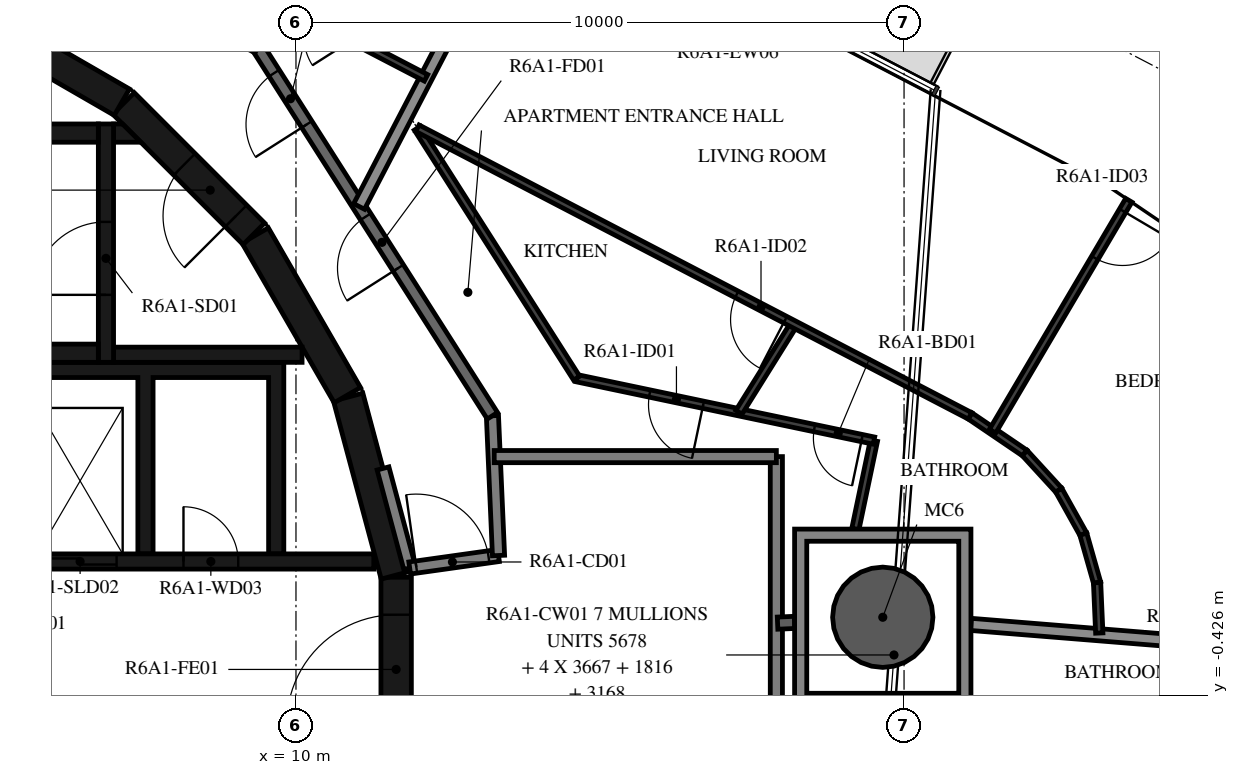
"""IFC4 building model, lengths in metres.
Left out: names, types, materials, properties, quantities, classifications, styles, units other than length and angle.
Written with IfcOpenShell. Run it as: python <this file> out.ifc"""

import sys

from ifc_helpers import new_model, si_unit, direction, frame, frame_2d, origin, origin_2d, place, context, subcontext, project, spatial, polyline, rectangle, hollow_circle, outline, extrude, element, fill, save


model = new_model("IFC4")
c1 = context("Model", 3, precision=1e-05, world=origin(), true_north=direction((0.0, 1.0)))
c2 = subcontext(c1, "Body", "Model", "MODEL_VIEW")
j1 = project(units=[si_unit("LENGTHUNIT", "METRE"), si_unit("PLANEANGLEUNIT", "RADIAN")], contexts=[c1])
p1 = place(None, origin())
s1 = spatial("IfcSite", under=j1, at=p1, CompositionType="ELEMENT")
p2 = place(p1, origin())
s2 = spatial("IfcBuilding", under=s1, at=p2, CompositionType="ELEMENT")
p3 = place(p2, frame((0.0, 0.0, 230.2)))
s3 = spatial("IfcBuildingStorey", under=s2, at=p3, CompositionType="ELEMENT", Elevation=230.2)
p4 = place(p3, frame((19.65, 0.858, -0.38), z_axis=(0.0, 0.0, 1.0), x_axis=(1.0, 0.0, 0.0)))
e1 = element("IfcColumn", 1, at=p4, inside=s3, PredefinedType="COLUMN", context=c2, shape_type="SweptSolid", body=[
    extrude(hollow_circle(Radius=0.825, WallThickness=0.04, at=origin_2d()), origin(), (0.0, 0.0, 1.0), 3.5),
])
p5 = place(p3, frame((11.647, -1.516, 0.0), z_axis=(0.0, 0.0, 1.0), x_axis=(0.0, 1.0, 0.0)))
e2 = element("IfcWall", 2, at=p5, inside=s3, PredefinedType="SHEAR", context=c2, shape_type="SweptSolid", body=[
    extrude(rectangle(XDim=3.033, YDim=0.5, at=frame_2d((1.516, 0.0))), origin(), (0.0, 0.0, 1.0), 3.12),
])
p6 = place(p5, frame((0.616, 0.0, 0.0)))
e3 = element("IfcOpeningElement", 3, at=p6, cuts=e2, PredefinedType="OPENING", context=c2, shape_type="SweptSolid", body=[
    extrude(rectangle(XDim=1.8, YDim=2.1, at=frame_2d((0.9, 1.05))), frame((0.0, 0.26, 0.0), z_axis=(0.0, -1.0, 0.0), x_axis=(1.0, 0.0, 0.0)), (0.0, 0.0, 1.0), 0.52),
])
for number, where, z_axis, x_axis in (
    (4, (11.643, 1.55, 0.0), (0.0, 0.0, 1.0), (-0.259, 0.966, 0.0)),
    (5, (10.845, 4.51, 0.0), (0.0, 0.0, 1.0), (-0.5, 0.866, 0.0)),
):
    element("IfcWall", number, at=place(p3, frame(where, z_axis=z_axis, x_axis=x_axis)), inside=s3, PredefinedType="SHEAR", context=c2, shape_type="SweptSolid", body=[
        extrude(rectangle(XDim=3.033, YDim=0.5, at=frame_2d((1.516, 0.0))), origin(), (0.0, 0.0, 1.0), 3.12),
    ])
p7 = place(p3, frame((9.308, 7.164, 0.0), z_axis=(0.0, 0.0, 1.0), x_axis=(-0.707106781187, 0.707106781187, 0.0)))
e6 = element("IfcWall", 6, at=p7, inside=s3, PredefinedType="SHEAR", context=c2, shape_type="SweptSolid", body=[
    extrude(rectangle(XDim=3.032, YDim=0.5, at=frame_2d((1.516, 0.0))), origin(), (0.0, 0.0, 1.0), 3.12),
])
p8 = place(p7, frame((0.416, 0.0, 0.0)))
e7 = element("IfcOpeningElement", 7, at=p8, cuts=e6, PredefinedType="OPENING", context=c2, shape_type="SweptSolid", body=[
    extrude(rectangle(XDim=1.2, YDim=2.1, at=frame_2d((0.6, 1.05))), frame((0.0, 0.26, 0.0), z_axis=(0.0, -1.0, 0.0), x_axis=(1.0, 0.0, 0.0)), (0.0, 0.0, 1.0), 0.52),
])
p9 = place(p3, frame((7.137, 9.329, 0.0), z_axis=(0.0, 0.0, 1.0), x_axis=(-0.865975092491, 0.500087131594, 0.0)))
e8 = element("IfcWall", 8, at=p9, inside=s3, PredefinedType="SHEAR", context=c2, shape_type="SweptSolid", body=[
    extrude(rectangle(XDim=3.033, YDim=0.5, at=frame_2d((1.516, 0.0))), origin(), (0.0, 0.0, 1.0), 3.12),
])
for number, where, z_axis, x_axis in (
    (9, (0.0, 5.2, 0.0), (0.0, 0.0, 1.0), (1.0, 0.0, 0.0)),
    (10, (0.0, 8.82, 0.0), (0.0, 0.0, 1.0), (1.0, 0.0, 0.0)),
):
    element("IfcWall", number, at=place(p3, frame(where, z_axis=z_axis, x_axis=x_axis)), inside=s3, PredefinedType="SHEAR", context=c2, shape_type="SweptSolid", body=[
        extrude(rectangle(XDim=6.75, YDim=0.3, at=frame_2d((3.375, 0.0))), origin(), (0.0, 0.0, 1.0), 3.12),
    ])
p10 = place(p3, frame((6.875, 5.05, 0.0), z_axis=(0.0, 0.0, 1.0), x_axis=(0.0, 1.0, 0.0)))
e11 = element("IfcWall", 11, at=p10, inside=s3, PredefinedType="SHEAR", context=c2, shape_type="SweptSolid", body=[
    extrude(rectangle(XDim=3.92, YDim=0.25, at=frame_2d((1.96, 0.0))), origin(), (0.0, 0.0, 1.0), 3.12),
])
p11 = place(p10, frame((1.11, 0.0, 0.0)))
e12 = element("IfcOpeningElement", 12, at=p11, cuts=e11, PredefinedType="OPENING", context=c2, shape_type="SweptSolid", body=[
    extrude(rectangle(XDim=1.2, YDim=2.1, at=frame_2d((0.6, 1.05))), frame((0.0, 0.135, 0.0), z_axis=(0.0, -1.0, 0.0), x_axis=(1.0, 0.0, 0.0)), (0.0, 0.0, 1.0), 0.27),
])
p12 = place(p3, frame((7.0, 5.175, 0.0), z_axis=(0.0, 0.0, 1.0), x_axis=(1.0, 0.0, 0.0)))
e13 = element("IfcWall", 13, at=p12, inside=s3, PredefinedType="SHEAR", context=c2, shape_type="SweptSolid", body=[
    extrude(rectangle(XDim=3.1, YDim=0.25, at=frame_2d((1.55, 0.0))), origin(), (0.0, 0.0, 1.0), 3.12),
])
p13 = place(p3, origin())
e14 = element("IfcWall", 14, at=p13, inside=s3, PredefinedType="SHEAR", context=c2, shape_type="SweptSolid", body=[
    extrude(outline(polyline([(7.448, 8.67), (7.0, 8.67), (7.0, 8.97), (7.148, 8.97), (7.448, 8.67)])), origin(), (0.0, 0.0, 1.0), 3.12),
])
p14 = place(p3, origin())
e15 = element("IfcWall", 15, at=p14, inside=s3, PredefinedType="SHEAR", context=c2, shape_type="SweptSolid", body=[
    extrude(outline(polyline([(-9.55, 4.8), (-5.5, 4.8), (-5.5, 1.9), (-5.25, 1.9), (-5.25, 4.8), (-1.2, 4.8), (-1.2, 1.9), (-0.95, 1.9), (-0.95, 4.8), (0.95, 4.8), (0.95, 1.9), (1.2, 1.9), (1.2, 4.8), (3.1, 4.8), (3.1, 1.9), (3.35, 1.9), (3.35, 4.8), (5.25, 4.8), (5.25, 1.9), (5.5, 1.9), (5.5, 4.8), (7.4, 4.8), (7.4, 1.9), (7.65, 1.9), (7.65, 4.8), (9.55, 4.8), (9.55, 1.9), (9.8, 1.9), (9.8, 4.8), (9.8, 5.05), (-9.8, 5.05), (-9.8, 4.8), (-9.8, 1.9), (-9.55, 1.9), (-9.55, 4.8)])), origin(), (0.0, 0.0, 1.0), 3.12),
])
p15 = place(p3, frame((3.35, 1.775, 0.0), z_axis=(0.0, 0.0, 1.0), x_axis=(1.0, 0.0, 0.0)))
e16 = element("IfcWall", 16, at=p15, inside=s3, PredefinedType="SHEAR", context=c2, shape_type="SweptSolid", body=[
    extrude(rectangle(XDim=7.93, YDim=0.25, at=frame_2d((3.965, 0.0))), origin(), (0.0, 0.0, 1.0), 3.12),
])
p16 = place(p15, frame((0.35, 0.0, 0.0)))
e17 = element("IfcOpeningElement", 17, at=p16, cuts=e16, PredefinedType="OPENING", context=c2, shape_type="SweptSolid", body=[
    extrude(rectangle(XDim=1.2, YDim=2.4, at=frame_2d((0.6, 1.2))), frame((0.0, 0.135, 0.0), z_axis=(0.0, -1.0, 0.0), x_axis=(1.0, 0.0, 0.0)), (0.0, 0.0, 1.0), 0.27),
])
p17 = place(p15, frame((2.5, 0.0, 0.0)))
e18 = element("IfcOpeningElement", 18, at=p17, cuts=e16, PredefinedType="OPENING", context=c2, shape_type="SweptSolid", body=[
    extrude(rectangle(XDim=1.2, YDim=2.4, at=frame_2d((0.6, 1.2))), frame((0.0, 0.135, 0.0), z_axis=(0.0, -1.0, 0.0), x_axis=(1.0, 0.0, 0.0)), (0.0, 0.0, 1.0), 0.27),
])
p18 = place(p15, frame((4.8, 0.0, 0.0)))
e19 = element("IfcOpeningElement", 19, at=p18, cuts=e16, PredefinedType="OPENING", context=c2, shape_type="SweptSolid", body=[
    extrude(rectangle(XDim=0.9, YDim=2.1, at=frame_2d((0.45, 1.05))), frame((0.0, 0.135, 0.0), z_axis=(0.0, -1.0, 0.0), x_axis=(1.0, 0.0, 0.0)), (0.0, 0.0, 1.0), 0.27),
])
p19 = place(p3, frame((11.87, 1.668, 0.0), z_axis=(0.0, 0.0, 1.0), x_axis=(-0.258836880648, 0.965921047093, 0.0)))
e20 = element("IfcWall", 20, at=p19, inside=s3, PredefinedType="STANDARD", context=c2, shape_type="SweptSolid", body=[
    extrude(rectangle(XDim=1.695, YDim=0.2, at=frame_2d((0.848, 0.0))), origin(), (0.0, 0.0, 1.0), 3.12),
])
p20 = place(p3, frame((11.87, 1.668, 0.0), z_axis=(0.0, 0.0, 1.0), x_axis=(0.990267985606, 0.139173692496, 0.0)))
e21 = element("IfcWall", 21, at=p20, inside=s3, PredefinedType="STANDARD", context=c2, shape_type="SweptSolid", body=[
    extrude(rectangle(XDim=1.475, YDim=0.2, at=frame_2d((0.738, 0.0))), origin(), (0.0, 0.0, 1.0), 3.12),
])
p21 = place(p20, frame((0.11, 0.0, 0.0)))
e22 = element("IfcOpeningElement", 22, at=p21, cuts=e21, PredefinedType="OPENING", context=c2, shape_type="SweptSolid", body=[
    extrude(rectangle(XDim=1.2, YDim=2.1, at=frame_2d((0.6, 1.05))), frame((0.0, 0.11, 0.0), z_axis=(0.0, -1.0, 0.0), x_axis=(1.0, 0.0, 0.0)), (0.0, 0.0, 1.0), 0.22),
])
p22 = place(p3, frame((13.331, 1.874, 0.0), z_axis=(0.0, 0.0, 1.0), x_axis=(-0.043621457762, 0.999048131184, 0.0)))
e23 = element("IfcWall", 23, at=p22, inside=s3, PredefinedType="STANDARD", context=c2, shape_type="SweptSolid", body=[
    extrude(rectangle(XDim=2.3, YDim=0.2, at=frame_2d((1.15, 0.0))), origin(), (0.0, 0.0, 1.0), 3.12),
])
p23 = place(p3, frame((13.231, 4.172, 0.0), z_axis=(0.0, 0.0, 1.0), x_axis=(-0.537304397561, 0.843388394728, 0.0)))
e24 = element("IfcWall", 24, at=p23, inside=s3, PredefinedType="STANDARD", context=c2, shape_type="SweptSolid", body=[
    extrude(rectangle(XDim=7.181, YDim=0.2, at=frame_2d((3.59, 0.0))), origin(), (0.0, 0.0, 1.0), 3.12),
])
p24 = place(p23, frame((2.881, 0.0, 0.0)))
e25 = element("IfcOpeningElement", 25, at=p24, cuts=e24, PredefinedType="OPENING", context=c2, shape_type="SweptSolid", body=[
    extrude(rectangle(XDim=1.0, YDim=2.1, at=frame_2d((0.5, 1.05))), frame((0.0, 0.11, 0.0), z_axis=(0.0, -1.0, 0.0), x_axis=(1.0, 0.0, 0.0)), (0.0, 0.0, 1.0), 0.22),
])
p25 = place(p23, frame((5.681, 0.0, 0.0)))
e26 = element("IfcOpeningElement", 26, at=p25, cuts=e24, PredefinedType="OPENING", context=c2, shape_type="SweptSolid", body=[
    extrude(rectangle(XDim=1.0, YDim=2.1, at=frame_2d((0.5, 1.05))), frame((0.0, 0.11, 0.0), z_axis=(0.0, -1.0, 0.0), x_axis=(1.0, 0.0, 0.0)), (0.0, 0.0, 1.0), 0.22),
])
p26 = place(p3, frame((9.372, 10.228, 0.0), z_axis=(0.0, 0.0, 1.0), x_axis=(-0.887005184532, 0.461759464021, 0.0)))
e27 = element("IfcWall", 27, at=p26, inside=s3, PredefinedType="STANDARD", context=c2, shape_type="SweptSolid", body=[
    extrude(rectangle(XDim=7.181, YDim=0.2, at=frame_2d((3.591, 0.0))), origin(), (0.0, 0.0, 1.0), 3.12),
])
p27 = place(p3, frame((17.9, -1.772, 0.0), z_axis=(0.0, 0.0, 1.0), x_axis=(0.0, 1.0, 0.0)))
e28 = element("IfcWall", 28, at=p27, inside=s3, PredefinedType="STANDARD", context=c2, shape_type="SweptSolid", body=[
    extrude(rectangle(XDim=5.272, YDim=0.2, at=frame_2d((2.636, 0.0))), origin(), (0.0, 0.0, 1.0), 3.12),
])
p28 = place(p3, frame((17.9, 3.5, 0.0), z_axis=(0.0, 0.0, 1.0), x_axis=(-1.0, 0.0, 0.0)))
e29 = element("IfcWall", 29, at=p28, inside=s3, PredefinedType="STANDARD", context=c2, shape_type="SweptSolid", body=[
    extrude(rectangle(XDim=4.64, YDim=0.2, at=frame_2d((2.32, 0.0))), origin(), (0.0, 0.0, 1.0), 3.12),
])
p29 = place(p3, frame((13.801, 12.922, 0.0), z_axis=(0.0, 0.0, 1.0), x_axis=(-0.461726485624, -0.887022351733, 0.0)))
e30 = element("IfcWall", 30, at=p29, inside=s3, PredefinedType="STANDARD", context=c2, shape_type="SweptSolid", body=[
    extrude(rectangle(XDim=5.984, YDim=0.2, at=frame_2d((2.992, 0.0))), origin(), (0.0, 0.0, 1.0), 2.73),
])
p30 = place(p3, frame((17.92, 0.761, 0.0), z_axis=(0.0, 0.0, 1.0), x_axis=(0.999051221661, 0.04355061995, 0.0)))
e31 = element("IfcWall", 31, at=p30, inside=s3, PredefinedType="STANDARD", context=c2, shape_type="SweptSolid", body=[
    extrude(rectangle(XDim=0.28, YDim=0.2, at=frame_2d((0.14, 0.0))), origin(), (0.0, 0.0, 1.0), 3.12),
])
p31 = place(p3, frame((21.1, 0.741, 0.0), z_axis=(0.0, 0.0, 1.0), x_axis=(0.996750718609, -0.080548153006, 0.0)))
e32 = element("IfcWall", 32, at=p31, inside=s3, PredefinedType="STANDARD", context=c2, shape_type="SweptSolid", body=[
    extrude(rectangle(XDim=6.538, YDim=0.2, at=frame_2d((3.269, 0.0))), origin(), (0.0, 0.0, 1.0), 2.73),
])
p32 = place(p3, frame((19.199, 2.308, 0.0), z_axis=(0.0, 0.0, 1.0), x_axis=(0.205580140246, 0.978640284239, 0.0)))
e33 = element("IfcWall", 33, at=p32, inside=s3, PredefinedType="PARTITIONING", context=c2, shape_type="SweptSolid", body=[
    extrude(rectangle(XDim=1.487, YDim=0.12, at=frame_2d((0.743, 0.0))), origin(), (0.0, 0.0, 1.0), 3.12),
])
p33 = place(p3, frame((19.505, 3.763, 0.0), z_axis=(0.0, 0.0, 1.0), x_axis=(-0.978660081285, 0.205485876157, 0.0)))
e34 = element("IfcWall", 34, at=p33, inside=s3, PredefinedType="PARTITIONING", context=c2, shape_type="SweptSolid", body=[
    extrude(rectangle(XDim=4.996, YDim=0.12, at=frame_2d((2.498, 0.0))), origin(), (0.0, 0.0, 1.0), 3.12),
])
p34 = place(p33, frame((0.2, 0.0, 0.0)))
e35 = element("IfcOpeningElement", 35, at=p34, cuts=e34, PredefinedType="OPENING", context=c2, shape_type="SweptSolid", body=[
    extrude(rectangle(XDim=0.8, YDim=2.1, at=frame_2d((0.4, 1.05))), frame((0.0, 0.07, 0.0), z_axis=(0.0, -1.0, 0.0), x_axis=(1.0, 0.0, 0.0)), (0.0, 0.0, 1.0), 0.14),
])
p35 = place(p33, frame((2.869, 0.0, 0.0)))
e36 = element("IfcOpeningElement", 36, at=p35, cuts=e34, PredefinedType="OPENING", context=c2, shape_type="SweptSolid", body=[
    extrude(rectangle(XDim=0.9, YDim=2.1, at=frame_2d((0.45, 1.05))), frame((0.0, 0.07, 0.0), z_axis=(0.0, -1.0, 0.0), x_axis=(1.0, 0.0, 0.0)), (0.0, 0.0, 1.0), 0.14),
])
p36 = place(p3, frame((14.615, 4.79, 0.0), z_axis=(0.0, 0.0, 1.0), x_axis=(-0.537312928062, 0.843382960071, 0.0)))
e37 = element("IfcWall", 37, at=p36, inside=s3, PredefinedType="PARTITIONING", context=c2, shape_type="SweptSolid", body=[
    extrude(rectangle(XDim=4.875, YDim=0.12, at=frame_2d((2.437, 0.0))), origin(), (0.0, 0.0, 1.0), 3.12),
])
p37 = place(p3, frame((21.085, 4.169, 0.0), z_axis=(0.0, 0.0, 1.0), x_axis=(0.827390024541, -0.561627765776, 0.0)))
e38 = element("IfcWall", 38, at=p37, inside=s3, PredefinedType="PARTITIONING", context=c2, shape_type="SweptSolid", body=[
    extrude(rectangle(XDim=1.087, YDim=0.12, at=frame_2d((0.543, 0.0))), origin(), (0.0, 0.0, 1.0), 3.12),
])
p38 = place(p3, frame((21.984, 3.559, 0.0), z_axis=(0.0, 0.0, 1.0), x_axis=(0.675497816835, -0.737361986715, 0.0)))
e39 = element("IfcWall", 39, at=p38, inside=s3, PredefinedType="PARTITIONING", context=c2, shape_type="SweptSolid", body=[
    extrude(rectangle(XDim=0.829, YDim=0.12, at=frame_2d((0.415, 0.0))), origin(), (0.0, 0.0, 1.0), 3.12),
])
p39 = place(p3, frame((22.544, 2.948, 0.0), z_axis=(0.0, 0.0, 1.0), x_axis=(0.487392269075, -0.873183128585, 0.0)))
e40 = element("IfcWall", 40, at=p39, inside=s3, PredefinedType="PARTITIONING", context=c2, shape_type="SweptSolid", body=[
    extrude(rectangle(XDim=0.829, YDim=0.12, at=frame_2d((0.415, 0.0))), origin(), (0.0, 0.0, 1.0), 3.12),
])
for number, where, z_axis, x_axis in (
    (41, (22.948, 2.224, 0.0), (0.0, 0.0, 1.0), (0.273, -0.962, 0.0)),
    (42, (23.174, 1.427, 0.0), (0.0, 0.0, 1.0), (0.044, -0.999, 0.0)),
):
    element("IfcWall", number, at=place(p3, frame(where, z_axis=z_axis, x_axis=x_axis)), inside=s3, PredefinedType="PARTITIONING", context=c2, shape_type="SweptSolid", body=[
        extrude(rectangle(XDim=0.829, YDim=0.12, at=frame_2d((0.415, 0.0))), origin(), (0.0, 0.0, 1.0), 3.12),
    ])
p40 = place(p3, frame((23.696, 7.715, 0.0), z_axis=(0.0, 0.0, 1.0), x_axis=(-0.508219920645, -0.861227329025, 0.0)))
e43 = element("IfcWall", 43, at=p40, inside=s3, PredefinedType="PARTITIONING", context=c2, shape_type="SweptSolid", body=[
    extrude(rectangle(XDim=4.409, YDim=0.12, at=frame_2d((2.205, 0.0))), origin(), (0.0, 0.0, 1.0), 3.12),
])
p41 = place(p40, frame((0.2, 0.0, 0.0)))
e44 = element("IfcOpeningElement", 44, at=p41, cuts=e43, PredefinedType="OPENING", context=c2, shape_type="SweptSolid", body=[
    extrude(rectangle(XDim=0.9, YDim=2.1, at=frame_2d((0.45, 1.05))), frame((0.0, 0.07, 0.0), z_axis=(0.0, -1.0, 0.0), x_axis=(1.0, 0.0, 0.0)), (0.0, 0.0, 1.0), 0.14),
])
p42 = place(p3, frame((18.189, 5.677, 0.0), z_axis=(0.0, 0.0, 1.0), x_axis=(-0.529639004581, -0.848223157445, 0.0)))
e45 = element("IfcWall", 45, at=p42, inside=s3, PredefinedType="PARTITIONING", context=c2, shape_type="SweptSolid", body=[
    extrude(rectangle(XDim=1.707, YDim=0.12, at=frame_2d((0.854, 0.0))), origin(), (0.0, 0.0, 1.0), 3.12),
])
p43 = place(p3, frame((21.085, 4.169, 0.0), z_axis=(0.0, 0.0, 1.0), x_axis=(-0.887017373034, 0.461736050071, 0.0)))
e46 = element("IfcWall", 46, at=p43, inside=s3, PredefinedType="PARTITIONING", context=c2, shape_type="SweptSolid", body=[
    extrude(rectangle(XDim=10.247, YDim=0.12, at=frame_2d((5.123, 0.0))), origin(), (0.0, 0.0, 1.0), 3.12),
])
p44 = place(p43, frame((3.425, 0.0, 0.0)))
e47 = element("IfcOpeningElement", 47, at=p44, cuts=e46, PredefinedType="OPENING", context=c2, shape_type="SweptSolid", body=[
    extrude(rectangle(XDim=0.9, YDim=2.1, at=frame_2d((0.45, 1.05))), frame((0.0, 0.07, 0.0), z_axis=(0.0, -1.0, 0.0), x_axis=(1.0, 0.0, 0.0)), (0.0, 0.0, 1.0), 0.14),
])
p45 = place(p3, frame((12.139, 9.729, 0.0), z_axis=(0.0, 0.0, 1.0), x_axis=(-0.887046876331, 0.461679368383, 0.0)))
e48 = element("IfcWall", 48, at=p45, inside=s3, PredefinedType="PARTITIONING", context=c2, shape_type="SweptSolid", body=[
    extrude(rectangle(XDim=1.13, YDim=0.12, at=frame_2d((0.565, 0.0))), origin(), (0.0, 0.0, 1.0), 3.12),
])
p46 = place(p3, frame((27.616, 0.212, 0.0), z_axis=(0.0, 0.0, 1.0), x_axis=(-0.969995609005, -0.243122435227, 0.0)))
e49 = element("IfcWall", 49, at=p46, inside=s3, PredefinedType="PARTITIONING", context=c2, shape_type="SweptSolid", body=[
    extrude(rectangle(XDim=8.81, YDim=0.12, at=frame_2d((4.405, 0.0))), origin(), (0.0, 0.0, 1.0), 3.12),
])
p47 = place(p46, frame((2.5, 0.0, 0.0)))
e50 = element("IfcOpeningElement", 50, at=p47, cuts=e49, PredefinedType="OPENING", context=c2, shape_type="SweptSolid", body=[
    extrude(rectangle(XDim=0.8, YDim=2.1, at=frame_2d((0.4, 1.05))), frame((0.0, 0.07, 0.0), z_axis=(0.0, -1.0, 0.0), x_axis=(1.0, 0.0, 0.0)), (0.0, 0.0, 1.0), 0.14),
])
p48 = place(p3, origin())
e51 = element("IfcWall", 51, at=p48, inside=s3, PredefinedType="STANDARD", context=c2, shape_type="SweptSolid", body=[
    extrude(outline(polyline([(21.1, 2.308), (21.1, -0.592), (18.2, -0.592), (18.2, 2.308), (21.1, 2.308)]), holes=[polyline([(18.4, -0.392), (20.9, -0.392), (20.9, 2.108), (18.4, 2.108), (18.4, -0.392)])]), origin(), (0.0, 0.0, 1.0), 3.12),
])
p49 = place(p11, origin())
e52 = element("IfcDoor", 52, at=p49, inside=s3, OperationType="SINGLE_SWING_LEFT", PredefinedType="DOOR", context=c2, shape_type="SweptSolid", body=[
    extrude(rectangle(XDim=1.2, YDim=2.1, at=frame_2d((0.6, 1.05))), frame((0.0, 0.025, 0.0), z_axis=(0.0, -1.0, 0.0), x_axis=(1.0, 0.0, 0.0)), (0.0, 0.0, 1.0), 0.05),
])
fill(e12, e52)
p50 = place(p8, origin())
e53 = element("IfcDoor", 53, at=p50, inside=s3, OperationType="SINGLE_SWING_RIGHT", PredefinedType="DOOR", context=c2, shape_type="SweptSolid", body=[
    extrude(rectangle(XDim=1.2, YDim=2.1, at=frame_2d((0.6, 1.05))), frame((0.0, 0.025, 0.0), z_axis=(0.0, -1.0, 0.0), x_axis=(1.0, 0.0, 0.0)), (0.0, 0.0, 1.0), 0.05),
])
fill(e7, e53)
p51 = place(p6, origin())
e54 = element("IfcDoor", 54, at=p51, inside=s3, OperationType="DOUBLE_DOOR_SINGLE_SWING", PredefinedType="DOOR", context=c2, shape_type="SweptSolid", body=[
    extrude(rectangle(XDim=1.8, YDim=2.1, at=frame_2d((0.9, 1.05))), frame((0.0, 0.025, 0.0), z_axis=(0.0, -1.0, 0.0), x_axis=(1.0, 0.0, 0.0)), (0.0, 0.0, 1.0), 0.05),
])
fill(e3, e54)
p52 = place(p17, origin())
e55 = element("IfcDoor", 55, at=p52, inside=s3, OperationType="DOUBLE_DOOR_SLIDING", PredefinedType="DOOR", context=c2, shape_type="SweptSolid", body=[
    extrude(rectangle(XDim=1.2, YDim=2.4, at=frame_2d((0.6, 1.2))), frame((0.0, 0.025, 0.0), z_axis=(0.0, -1.0, 0.0), x_axis=(1.0, 0.0, 0.0)), (0.0, 0.0, 1.0), 0.05),
])
fill(e18, e55)
p53 = place(p18, origin())
e56 = element("IfcDoor", 56, at=p53, inside=s3, OperationType="SINGLE_SWING_LEFT", PredefinedType="DOOR", context=c2, shape_type="SweptSolid", body=[
    extrude(rectangle(XDim=0.9, YDim=2.1, at=frame_2d((0.45, 1.05))), frame((0.0, 0.025, 0.0), z_axis=(0.0, -1.0, 0.0), x_axis=(1.0, 0.0, 0.0)), (0.0, 0.0, 1.0), 0.05),
])
fill(e19, e56)
p54 = place(p24, origin())
e57 = element("IfcDoor", 57, at=p54, inside=s3, OperationType="SINGLE_SWING_LEFT", PredefinedType="DOOR", context=c2, shape_type="SweptSolid", body=[
    extrude(rectangle(XDim=1.0, YDim=2.1, at=frame_2d((0.5, 1.05))), frame((0.0, 0.025, 0.0), z_axis=(0.0, -1.0, 0.0), x_axis=(1.0, 0.0, 0.0)), (0.0, 0.0, 1.0), 0.05),
])
fill(e25, e57)
p55 = place(p34, origin())
e58 = element("IfcDoor", 58, at=p55, inside=s3, OperationType="SINGLE_SWING_LEFT", PredefinedType="DOOR", context=c2, shape_type="SweptSolid", body=[
    extrude(rectangle(XDim=0.8, YDim=2.1, at=frame_2d((0.4, 1.05))), frame((0.0, 0.025, 0.0), z_axis=(0.0, -1.0, 0.0), x_axis=(1.0, 0.0, 0.0)), (0.0, 0.0, 1.0), 0.05),
])
fill(e35, e58)
p56 = place(p35, origin())
e59 = element("IfcDoor", 59, at=p56, inside=s3, OperationType="SINGLE_SWING_LEFT", PredefinedType="DOOR", context=c2, shape_type="SweptSolid", body=[
    extrude(rectangle(XDim=0.9, YDim=2.1, at=frame_2d((0.45, 1.05))), frame((0.0, 0.025, 0.0), z_axis=(0.0, -1.0, 0.0), x_axis=(1.0, 0.0, 0.0)), (0.0, 0.0, 1.0), 0.05),
])
fill(e36, e59)
p57 = place(p44, origin())
e60 = element("IfcDoor", 60, at=p57, inside=s3, OperationType="SINGLE_SWING_LEFT", PredefinedType="DOOR", context=c2, shape_type="SweptSolid", body=[
    extrude(rectangle(XDim=0.9, YDim=2.1, at=frame_2d((0.45, 1.05))), frame((0.0, 0.025, 0.0), z_axis=(0.0, -1.0, 0.0), x_axis=(1.0, 0.0, 0.0)), (0.0, 0.0, 1.0), 0.05),
])
fill(e47, e60)
p58 = place(p41, origin())
e61 = element("IfcDoor", 61, at=p58, inside=s3, OperationType="SINGLE_SWING_LEFT", PredefinedType="DOOR", context=c2, shape_type="SweptSolid", body=[
    extrude(rectangle(XDim=0.9, YDim=2.1, at=frame_2d((0.45, 1.05))), frame((0.0, 0.025, 0.0), z_axis=(0.0, -1.0, 0.0), x_axis=(1.0, 0.0, 0.0)), (0.0, 0.0, 1.0), 0.05),
])
fill(e44, e61)
p59 = place(p25, origin())
e62 = element("IfcDoor", 62, at=p59, inside=s3, OperationType="SINGLE_SWING_LEFT", PredefinedType="DOOR", context=c2, shape_type="SweptSolid", body=[
    extrude(rectangle(XDim=1.0, YDim=2.1, at=frame_2d((0.5, 1.05))), frame((0.0, 0.025, 0.0), z_axis=(0.0, -1.0, 0.0), x_axis=(1.0, 0.0, 0.0)), (0.0, 0.0, 1.0), 0.05),
])
fill(e26, e62)
p60 = place(p21, origin())
e63 = element("IfcDoor", 63, at=p60, inside=s3, OperationType="DOUBLE_DOOR_SINGLE_SWING", PredefinedType="DOOR", context=c2, shape_type="SweptSolid", body=[
    extrude(rectangle(XDim=1.2, YDim=2.1, at=frame_2d((0.6, 1.05))), frame((0.0, 0.025, 0.0), z_axis=(0.0, -1.0, 0.0), x_axis=(1.0, 0.0, 0.0)), (0.0, 0.0, 1.0), 0.05),
])
fill(e22, e63)
save(model, sys.argv[1])
